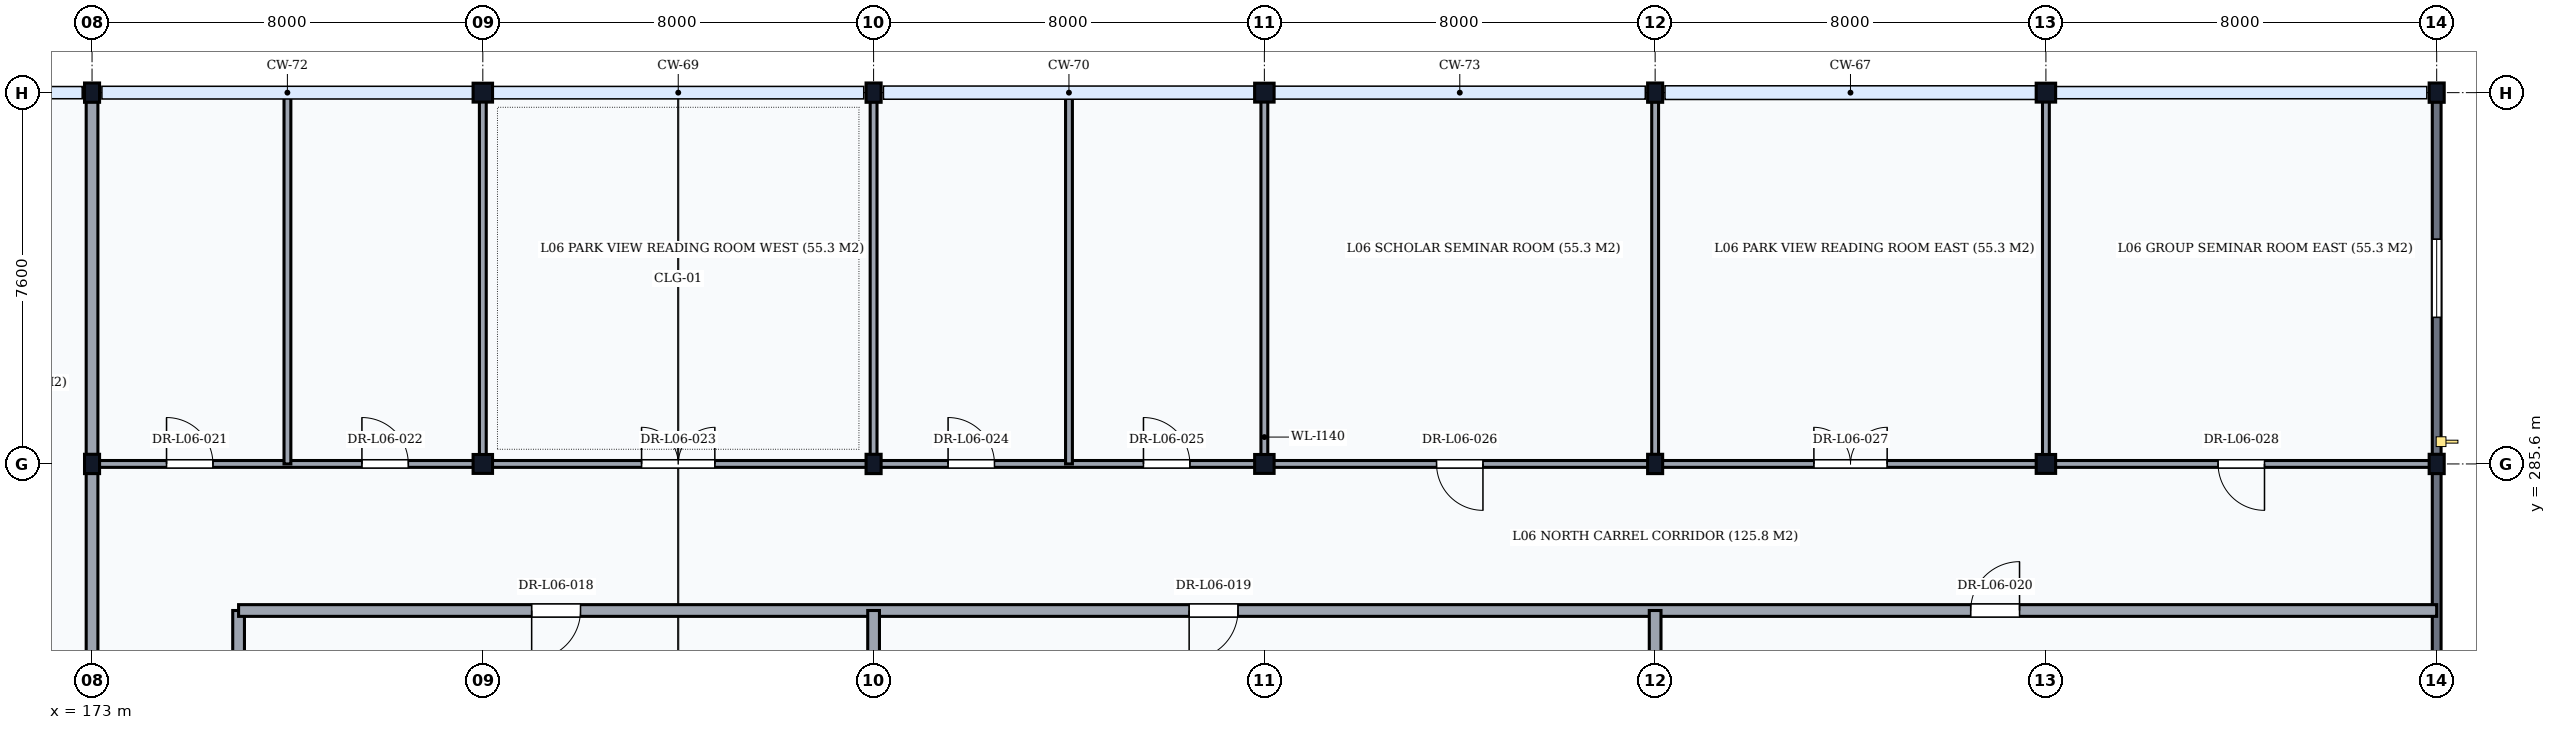
"""IFC4 building model, lengths in metres.
Left out: names, types, materials, properties, quantities, classifications, styles, units other than length and angle.
Written with IfcOpenShell. Run it as: python <this file> out.ifc"""

import sys

from ifc_helpers import new_model, si_unit, direction, frame, frame_2d, origin, origin_2d, place, context, subcontext, project, spatial, rectangle, i_section, extrude, element, fill, save


model = new_model("IFC4")
c1 = context("Model", 3, precision=1e-05, world=origin(), true_north=direction((0.0, 1.0)))
c2 = subcontext(c1, "Body", "Model", "MODEL_VIEW")
j1 = project(units=[si_unit("LENGTHUNIT", "METRE"), si_unit("PLANEANGLEUNIT", "RADIAN")], contexts=[c1])
p1 = place(None, origin())
s1 = spatial("IfcSite", under=j1, at=p1, CompositionType="ELEMENT")
p2 = place(p1, origin())
s2 = spatial("IfcBuilding", under=s1, at=p2, CompositionType="ELEMENT")
p3 = place(p2, frame((0.0, 0.0, 24.3)))
s3 = spatial("IfcBuildingStorey", under=s2, at=p3, CompositionType="ELEMENT", Elevation=24.3)
for number, where, z_axis, x_axis in (
    (1, (173.0, 285.6, 0.0), (0.0, 0.0, 1.0), (1.0, 0.0, 0.0)),
    (2, (173.0, 293.2, 0.0), (0.0, 0.0, 1.0), (1.0, 0.0, 0.0)),
):
    element("IfcColumn", number, at=place(p3, frame(where, z_axis=z_axis, x_axis=x_axis)), inside=s3, PredefinedType="COLUMN", context=c2, shape_type="SweptSolid", body=[
        extrude(i_section(OverallWidth=0.308, OverallDepth=0.395, WebThickness=0.021, FlangeThickness=0.04, FilletRadius=0.027, at=origin_2d()), origin(), (0.0, 0.0, 1.0), 3.9),
    ])
for number, where, z_axis, x_axis in (
    (3, (181.0, 285.6, 0.0), (0.0, 0.0, 1.0), (1.0, 0.0, 0.0)),
    (4, (181.0, 293.2, 0.0), (0.0, 0.0, 1.0), (1.0, 0.0, 0.0)),
):
    element("IfcColumn", number, at=place(p3, frame(where, z_axis=z_axis, x_axis=x_axis)), inside=s3, PredefinedType="COLUMN", context=c2, shape_type="SweptSolid", body=[
        extrude(i_section(OverallWidth=0.398, OverallDepth=0.387, WebThickness=0.021, FlangeThickness=0.033, FilletRadius=0.015, at=origin_2d()), origin(), (0.0, 0.0, 1.0), 3.9),
    ])
for number, where, z_axis, x_axis in (
    (5, (189.0, 285.6, 0.0), (0.0, 0.0, 1.0), (1.0, 0.0, 0.0)),
    (6, (189.0, 293.2, 0.0), (0.0, 0.0, 1.0), (1.0, 0.0, 0.0)),
):
    element("IfcColumn", number, at=place(p3, frame(where, z_axis=z_axis, x_axis=x_axis)), inside=s3, PredefinedType="COLUMN", context=c2, shape_type="SweptSolid", body=[
        extrude(i_section(OverallWidth=0.308, OverallDepth=0.395, WebThickness=0.021, FlangeThickness=0.04, FilletRadius=0.027, at=origin_2d()), origin(), (0.0, 0.0, 1.0), 3.9),
    ])
for number, where, z_axis, x_axis in (
    (7, (197.0, 285.6, 0.0), (0.0, 0.0, 1.0), (1.0, 0.0, 0.0)),
    (8, (197.0, 293.2, 0.0), (0.0, 0.0, 1.0), (1.0, 0.0, 0.0)),
):
    element("IfcColumn", number, at=place(p3, frame(where, z_axis=z_axis, x_axis=x_axis)), inside=s3, PredefinedType="COLUMN", context=c2, shape_type="SweptSolid", body=[
        extrude(i_section(OverallWidth=0.398, OverallDepth=0.387, WebThickness=0.021, FlangeThickness=0.033, FilletRadius=0.015, at=origin_2d()), origin(), (0.0, 0.0, 1.0), 3.9),
    ])
for number, where, z_axis, x_axis in (
    (9, (205.0, 285.6, 0.0), (0.0, 0.0, 1.0), (1.0, 0.0, 0.0)),
    (10, (205.0, 293.2, 0.0), (0.0, 0.0, 1.0), (1.0, 0.0, 0.0)),
):
    element("IfcColumn", number, at=place(p3, frame(where, z_axis=z_axis, x_axis=x_axis)), inside=s3, PredefinedType="COLUMN", context=c2, shape_type="SweptSolid", body=[
        extrude(i_section(OverallWidth=0.308, OverallDepth=0.395, WebThickness=0.021, FlangeThickness=0.04, FilletRadius=0.027, at=origin_2d()), origin(), (0.0, 0.0, 1.0), 3.9),
    ])
for number, where, z_axis, x_axis in (
    (11, (213.0, 285.6, 0.0), (0.0, 0.0, 1.0), (1.0, 0.0, 0.0)),
    (12, (213.0, 293.2, 0.0), (0.0, 0.0, 1.0), (1.0, 0.0, 0.0)),
):
    element("IfcColumn", number, at=place(p3, frame(where, z_axis=z_axis, x_axis=x_axis)), inside=s3, PredefinedType="COLUMN", context=c2, shape_type="SweptSolid", body=[
        extrude(i_section(OverallWidth=0.398, OverallDepth=0.387, WebThickness=0.021, FlangeThickness=0.033, FilletRadius=0.015, at=origin_2d()), origin(), (0.0, 0.0, 1.0), 3.9),
    ])
for number, where, z_axis, x_axis in (
    (13, (221.0, 285.6, 0.0), (0.0, 0.0, 1.0), (1.0, 0.0, 0.0)),
    (14, (221.0, 293.2, 0.0), (0.0, 0.0, 1.0), (1.0, 0.0, 0.0)),
):
    element("IfcColumn", number, at=place(p3, frame(where, z_axis=z_axis, x_axis=x_axis)), inside=s3, PredefinedType="COLUMN", context=c2, shape_type="SweptSolid", body=[
        extrude(i_section(OverallWidth=0.308, OverallDepth=0.395, WebThickness=0.021, FlangeThickness=0.04, FilletRadius=0.027, at=origin_2d()), origin(), (0.0, 0.0, 1.0), 3.9),
    ])
p4 = place(p3, frame((221.0, 278.006, 0.0), z_axis=(0.0, 0.0, 1.0), x_axis=(0.0, 1.0, 0.0)))
e15 = element("IfcWall", 15, at=p4, inside=s3, PredefinedType="SOLIDWALL", context=c2, shape_type="SweptSolid", body=[
    extrude(rectangle(XDim=7.588, YDim=0.18, at=frame_2d((3.794, 0.0))), origin(), (0.0, 0.0, 1.0), 3.388),
])
p5 = place(p4, frame((1.622, 0.0, 0.95)))
e16 = element("IfcOpeningElement", 16, at=p5, cuts=e15, PredefinedType="OPENING", context=c2, shape_type="SweptSolid", body=[
    extrude(rectangle(XDim=1.8, YDim=2.0, at=frame_2d((0.9, 1.0))), frame((0.0, 0.105, 0.0), z_axis=(0.0, -1.0, 0.0), x_axis=(1.0, 0.0, 0.0)), (0.0, 0.0, 1.0), 0.21),
])
p6 = place(p3, frame((221.0, 285.606, 0.0), z_axis=(0.0, 0.0, 1.0), x_axis=(0.0, 1.0, 0.0)))
e17 = element("IfcWall", 17, at=p6, inside=s3, PredefinedType="SOLIDWALL", context=c2, shape_type="SweptSolid", body=[
    extrude(rectangle(XDim=7.588, YDim=0.18, at=frame_2d((3.794, 0.0))), origin(), (0.0, 0.0, 1.0), 3.388),
])
p7 = place(p6, frame((2.994, 0.0, 0.95)))
e18 = element("IfcOpeningElement", 18, at=p7, cuts=e17, PredefinedType="OPENING", context=c2, shape_type="SweptSolid", body=[
    extrude(rectangle(XDim=1.6, YDim=2.0, at=frame_2d((0.8, 1.0))), frame((0.0, 0.105, 0.0), z_axis=(0.0, -1.0, 0.0), x_axis=(1.0, 0.0, 0.0)), (0.0, 0.0, 1.0), 0.21),
])
p8 = place(p3, frame((173.0, 258.2, 0.0), z_axis=(0.0, 0.0, 1.0), x_axis=(0.0, 1.0, 0.0)))
e19 = element("IfcWall", 19, at=p8, inside=s3, PredefinedType="PARTITIONING", context=c2, shape_type="SweptSolid", body=[
    extrude(rectangle(XDim=35.0, YDim=0.24, at=frame_2d((17.5, 0.0))), origin(), (0.0, 0.0, 1.0), 3.208),
])
p9 = place(p8, frame((21.5, 0.0, 0.0)))
e20 = element("IfcOpeningElement", 20, at=p9, cuts=e19, PredefinedType="OPENING", context=c2, shape_type="SweptSolid", body=[
    extrude(rectangle(XDim=1.0, YDim=2.1, at=frame_2d((0.5, 1.05))), frame((0.0, 0.135, 0.0), z_axis=(0.0, -1.0, 0.0), x_axis=(1.0, 0.0, 0.0)), (0.0, 0.0, 1.0), 0.27),
])
p10 = place(p3, frame((176.0, 258.2, 0.0), z_axis=(0.0, 0.0, 1.0), x_axis=(0.0, 1.0, 0.0)))
e21 = element("IfcWall", 21, at=p10, inside=s3, PredefinedType="PARTITIONING", context=c2, shape_type="SweptSolid", body=[
    extrude(rectangle(XDim=24.4, YDim=0.24, at=frame_2d((12.2, 0.0))), origin(), (0.0, 0.0, 1.0), 3.66),
])
p11 = place(p3, frame((176.0, 282.6, 0.0), z_axis=(0.0, 0.0, 1.0), x_axis=(1.0, 0.0, 0.0)))
e22 = element("IfcWall", 22, at=p11, inside=s3, PredefinedType="PARTITIONING", context=c2, shape_type="SweptSolid", body=[
    extrude(rectangle(XDim=45.0, YDim=0.24, at=frame_2d((22.5, 0.0))), origin(), (0.0, 0.0, 1.0), 3.66),
])
p12 = place(p11, frame((6.0, 0.0, 0.0)))
e23 = element("IfcOpeningElement", 23, at=p12, cuts=e22, PredefinedType="OPENING", context=c2, shape_type="SweptSolid", body=[
    extrude(rectangle(XDim=1.0, YDim=2.1, at=frame_2d((0.5, 1.05))), frame((0.0, 0.135, 0.0), z_axis=(0.0, -1.0, 0.0), x_axis=(1.0, 0.0, 0.0)), (0.0, 0.0, 1.0), 0.27),
])
p13 = place(p11, frame((19.46, 0.0, 0.0)))
e24 = element("IfcOpeningElement", 24, at=p13, cuts=e22, PredefinedType="OPENING", context=c2, shape_type="SweptSolid", body=[
    extrude(rectangle(XDim=1.0, YDim=2.1, at=frame_2d((0.5, 1.05))), frame((0.0, 0.135, 0.0), z_axis=(0.0, -1.0, 0.0), x_axis=(1.0, 0.0, 0.0)), (0.0, 0.0, 1.0), 0.27),
])
p14 = place(p11, frame((35.46, 0.0, 0.0)))
e25 = element("IfcOpeningElement", 25, at=p14, cuts=e22, PredefinedType="OPENING", context=c2, shape_type="SweptSolid", body=[
    extrude(rectangle(XDim=1.0, YDim=2.1, at=frame_2d((0.5, 1.05))), frame((0.0, 0.135, 0.0), z_axis=(0.0, -1.0, 0.0), x_axis=(1.0, 0.0, 0.0)), (0.0, 0.0, 1.0), 0.27),
])
for number, where, z_axis, x_axis in (
    (26, (189.0, 258.2, 0.0), (0.0, 0.0, 1.0), (0.0, 1.0, 0.0)),
    (27, (205.0, 258.2, 0.0), (0.0, 0.0, 1.0), (0.0, 1.0, 0.0)),
):
    element("IfcWall", number, at=place(p3, frame(where, z_axis=z_axis, x_axis=x_axis)), inside=s3, PredefinedType="PARTITIONING", context=c2, shape_type="SweptSolid", body=[
        extrude(rectangle(XDim=24.4, YDim=0.24, at=frame_2d((12.2, 0.0))), origin(), (0.0, 0.0, 1.0), 3.208),
    ])
p15 = place(p3, frame((173.0, 285.6, 0.0), z_axis=(0.0, 0.0, 1.0), x_axis=(1.0, 0.0, 0.0)))
e28 = element("IfcWall", 28, at=p15, inside=s3, PredefinedType="PARTITIONING", context=c2, shape_type="SweptSolid", body=[
    extrude(rectangle(XDim=48.0, YDim=0.14, at=frame_2d((24.0, 0.0))), origin(), (0.0, 0.0, 1.0), 3.058),
])
p16 = place(p15, frame((1.525, 0.0, 0.0)))
e29 = element("IfcOpeningElement", 29, at=p16, cuts=e28, PredefinedType="OPENING", context=c2, shape_type="SweptSolid", body=[
    extrude(rectangle(XDim=0.95, YDim=2.1, at=frame_2d((0.475, 1.05))), frame((0.0, 0.085, 0.0), z_axis=(0.0, -1.0, 0.0), x_axis=(1.0, 0.0, 0.0)), (0.0, 0.0, 1.0), 0.17),
])
p17 = place(p15, frame((5.525, 0.0, 0.0)))
e30 = element("IfcOpeningElement", 30, at=p17, cuts=e28, PredefinedType="OPENING", context=c2, shape_type="SweptSolid", body=[
    extrude(rectangle(XDim=0.95, YDim=2.1, at=frame_2d((0.475, 1.05))), frame((0.0, 0.085, 0.0), z_axis=(0.0, -1.0, 0.0), x_axis=(1.0, 0.0, 0.0)), (0.0, 0.0, 1.0), 0.17),
])
p18 = place(p15, frame((11.25, 0.0, 0.0)))
e31 = element("IfcOpeningElement", 31, at=p18, cuts=e28, PredefinedType="OPENING", context=c2, shape_type="SweptSolid", body=[
    extrude(rectangle(XDim=1.5, YDim=2.25, at=frame_2d((0.75, 1.125))), frame((0.0, 0.085, 0.0), z_axis=(0.0, -1.0, 0.0), x_axis=(1.0, 0.0, 0.0)), (0.0, 0.0, 1.0), 0.17),
])
p19 = place(p15, frame((17.525, 0.0, 0.0)))
e32 = element("IfcOpeningElement", 32, at=p19, cuts=e28, PredefinedType="OPENING", context=c2, shape_type="SweptSolid", body=[
    extrude(rectangle(XDim=0.95, YDim=2.1, at=frame_2d((0.475, 1.05))), frame((0.0, 0.085, 0.0), z_axis=(0.0, -1.0, 0.0), x_axis=(1.0, 0.0, 0.0)), (0.0, 0.0, 1.0), 0.17),
])
p20 = place(p15, frame((21.525, 0.0, 0.0)))
e33 = element("IfcOpeningElement", 33, at=p20, cuts=e28, PredefinedType="OPENING", context=c2, shape_type="SweptSolid", body=[
    extrude(rectangle(XDim=0.95, YDim=2.1, at=frame_2d((0.475, 1.05))), frame((0.0, 0.085, 0.0), z_axis=(0.0, -1.0, 0.0), x_axis=(1.0, 0.0, 0.0)), (0.0, 0.0, 1.0), 0.17),
])
p21 = place(p15, frame((27.525, 0.0, 0.0)))
e34 = element("IfcOpeningElement", 34, at=p21, cuts=e28, PredefinedType="OPENING", context=c2, shape_type="SweptSolid", body=[
    extrude(rectangle(XDim=0.95, YDim=2.1, at=frame_2d((0.475, 1.05))), frame((0.0, 0.085, 0.0), z_axis=(0.0, -1.0, 0.0), x_axis=(1.0, 0.0, 0.0)), (0.0, 0.0, 1.0), 0.17),
])
p22 = place(p15, frame((35.25, 0.0, 0.0)))
e35 = element("IfcOpeningElement", 35, at=p22, cuts=e28, PredefinedType="OPENING", context=c2, shape_type="SweptSolid", body=[
    extrude(rectangle(XDim=1.5, YDim=2.25, at=frame_2d((0.75, 1.125))), frame((0.0, 0.085, 0.0), z_axis=(0.0, -1.0, 0.0), x_axis=(1.0, 0.0, 0.0)), (0.0, 0.0, 1.0), 0.17),
])
p23 = place(p15, frame((43.525, 0.0, 0.0)))
e36 = element("IfcOpeningElement", 36, at=p23, cuts=e28, PredefinedType="OPENING", context=c2, shape_type="SweptSolid", body=[
    extrude(rectangle(XDim=0.95, YDim=2.1, at=frame_2d((0.475, 1.05))), frame((0.0, 0.085, 0.0), z_axis=(0.0, -1.0, 0.0), x_axis=(1.0, 0.0, 0.0)), (0.0, 0.0, 1.0), 0.17),
])
p24 = place(p3, frame((177.0, 285.6, 0.0), z_axis=(0.0, 0.0, 1.0), x_axis=(0.0, 1.0, 0.0)))
e37 = element("IfcWall", 37, at=p24, inside=s3, PredefinedType="PARTITIONING", context=c2, shape_type="SweptSolid", body=[
    extrude(rectangle(XDim=7.6, YDim=0.14, at=frame_2d((3.8, 0.0))), origin(), (0.0, 0.0, 1.0), 3.388),
])
for number, where, z_axis, x_axis in (
    (38, (181.0, 285.6, 0.0), (0.0, 0.0, 1.0), (0.0, 1.0, 0.0)),
    (39, (189.0, 285.6, 0.0), (0.0, 0.0, 1.0), (0.0, 1.0, 0.0)),
):
    element("IfcWall", number, at=place(p3, frame(where, z_axis=z_axis, x_axis=x_axis)), inside=s3, PredefinedType="PARTITIONING", context=c2, shape_type="SweptSolid", body=[
        extrude(rectangle(XDim=7.6, YDim=0.14, at=frame_2d((3.8, 0.0))), origin(), (0.0, 0.0, 1.0), 3.208),
    ])
p25 = place(p3, frame((193.0, 285.6, 0.0), z_axis=(0.0, 0.0, 1.0), x_axis=(0.0, 1.0, 0.0)))
e40 = element("IfcWall", 40, at=p25, inside=s3, PredefinedType="PARTITIONING", context=c2, shape_type="SweptSolid", body=[
    extrude(rectangle(XDim=7.6, YDim=0.14, at=frame_2d((3.8, 0.0))), origin(), (0.0, 0.0, 1.0), 3.388),
])
for number, where, z_axis, x_axis in (
    (41, (197.0, 285.6, 0.0), (0.0, 0.0, 1.0), (0.0, 1.0, 0.0)),
    (42, (205.0, 285.6, 0.0), (0.0, 0.0, 1.0), (0.0, 1.0, 0.0)),
    (43, (213.0, 285.6, 0.0), (0.0, 0.0, 1.0), (0.0, 1.0, 0.0)),
):
    element("IfcWall", number, at=place(p3, frame(where, z_axis=z_axis, x_axis=x_axis)), inside=s3, PredefinedType="PARTITIONING", context=c2, shape_type="SweptSolid", body=[
        extrude(rectangle(XDim=7.6, YDim=0.14, at=frame_2d((3.8, 0.0))), origin(), (0.0, 0.0, 1.0), 3.208),
    ])
p26 = place(p7, origin())
e44 = element("IfcWindow", 44, at=p26, inside=s3, PartitioningType="SINGLE_PANEL", PredefinedType="WINDOW", context=c2, shape_type="SweptSolid", body=[
    extrude(rectangle(XDim=1.6, YDim=2.0, at=frame_2d((0.8, 1.0))), frame((0.0, 0.03, 0.0), z_axis=(0.0, -1.0, 0.0), x_axis=(1.0, 0.0, 0.0)), (0.0, 0.0, 1.0), 0.06),
])
fill(e18, e44)
p27 = place(p12, frame((1.0, 0.0, 0.0), z_axis=(0.0, 0.0, 1.0), x_axis=(-1.0, 0.0, 0.0)))
e45 = element("IfcDoor", 45, at=p27, inside=s3, OperationType="SINGLE_SWING_RIGHT", PredefinedType="DOOR", context=c2, shape_type="SweptSolid", body=[
    extrude(rectangle(XDim=1.0, YDim=2.1, at=frame_2d((0.5, 1.05))), frame((0.0, 0.025, 0.0), z_axis=(0.0, -1.0, 0.0), x_axis=(1.0, 0.0, 0.0)), (0.0, 0.0, 1.0), 0.05),
])
fill(e23, e45)
p28 = place(p13, frame((1.0, 0.0, 0.0), z_axis=(0.0, 0.0, 1.0), x_axis=(-1.0, 0.0, 0.0)))
e46 = element("IfcDoor", 46, at=p28, inside=s3, OperationType="SINGLE_SWING_RIGHT", PredefinedType="DOOR", context=c2, shape_type="SweptSolid", body=[
    extrude(rectangle(XDim=1.0, YDim=2.1, at=frame_2d((0.5, 1.05))), frame((0.0, 0.025, 0.0), z_axis=(0.0, -1.0, 0.0), x_axis=(1.0, 0.0, 0.0)), (0.0, 0.0, 1.0), 0.05),
])
fill(e24, e46)
p29 = place(p14, frame((1.0, 0.0, 0.0), z_axis=(0.0, 0.0, 1.0), x_axis=(-1.0, 0.0, 0.0)))
e47 = element("IfcDoor", 47, at=p29, inside=s3, OperationType="SINGLE_SWING_LEFT", PredefinedType="DOOR", context=c2, shape_type="SweptSolid", body=[
    extrude(rectangle(XDim=1.0, YDim=2.1, at=frame_2d((0.5, 1.05))), frame((0.0, 0.025, 0.0), z_axis=(0.0, -1.0, 0.0), x_axis=(1.0, 0.0, 0.0)), (0.0, 0.0, 1.0), 0.05),
])
fill(e25, e47)
p30 = place(p16, origin())
e48 = element("IfcDoor", 48, at=p30, inside=s3, OperationType="SINGLE_SWING_LEFT", PredefinedType="DOOR", context=c2, shape_type="SweptSolid", body=[
    extrude(rectangle(XDim=0.95, YDim=2.1, at=frame_2d((0.475, 1.05))), frame((0.0, 0.025, 0.0), z_axis=(0.0, -1.0, 0.0), x_axis=(1.0, 0.0, 0.0)), (0.0, 0.0, 1.0), 0.05),
])
fill(e29, e48)
p31 = place(p17, origin())
e49 = element("IfcDoor", 49, at=p31, inside=s3, OperationType="SINGLE_SWING_LEFT", PredefinedType="DOOR", context=c2, shape_type="SweptSolid", body=[
    extrude(rectangle(XDim=0.95, YDim=2.1, at=frame_2d((0.475, 1.05))), frame((0.0, 0.025, 0.0), z_axis=(0.0, -1.0, 0.0), x_axis=(1.0, 0.0, 0.0)), (0.0, 0.0, 1.0), 0.05),
])
fill(e30, e49)
p32 = place(p18, origin())
e50 = element("IfcDoor", 50, at=p32, inside=s3, OperationType="DOUBLE_DOOR_SINGLE_SWING", PredefinedType="DOOR", context=c2, shape_type="SweptSolid", body=[
    extrude(rectangle(XDim=1.5, YDim=2.25, at=frame_2d((0.75, 1.125))), frame((0.0, 0.025, 0.0), z_axis=(0.0, -1.0, 0.0), x_axis=(1.0, 0.0, 0.0)), (0.0, 0.0, 1.0), 0.05),
])
fill(e31, e50)
p33 = place(p19, origin())
e51 = element("IfcDoor", 51, at=p33, inside=s3, OperationType="SINGLE_SWING_LEFT", PredefinedType="DOOR", context=c2, shape_type="SweptSolid", body=[
    extrude(rectangle(XDim=0.95, YDim=2.1, at=frame_2d((0.475, 1.05))), frame((0.0, 0.025, 0.0), z_axis=(0.0, -1.0, 0.0), x_axis=(1.0, 0.0, 0.0)), (0.0, 0.0, 1.0), 0.05),
])
fill(e32, e51)
p34 = place(p20, origin())
e52 = element("IfcDoor", 52, at=p34, inside=s3, OperationType="SINGLE_SWING_LEFT", PredefinedType="DOOR", context=c2, shape_type="SweptSolid", body=[
    extrude(rectangle(XDim=0.95, YDim=2.1, at=frame_2d((0.475, 1.05))), frame((0.0, 0.025, 0.0), z_axis=(0.0, -1.0, 0.0), x_axis=(1.0, 0.0, 0.0)), (0.0, 0.0, 1.0), 0.05),
])
fill(e33, e52)
p35 = place(p21, origin())
e53 = element("IfcDoor", 53, at=p35, inside=s3, OperationType="SINGLE_SWING_RIGHT", PredefinedType="DOOR", context=c2, shape_type="SweptSolid", body=[
    extrude(rectangle(XDim=0.95, YDim=2.1, at=frame_2d((0.475, 1.05))), frame((0.0, 0.025, 0.0), z_axis=(0.0, -1.0, 0.0), x_axis=(1.0, 0.0, 0.0)), (0.0, 0.0, 1.0), 0.05),
])
fill(e34, e53)
p36 = place(p22, origin())
e54 = element("IfcDoor", 54, at=p36, inside=s3, OperationType="DOUBLE_DOOR_SINGLE_SWING", PredefinedType="DOOR", context=c2, shape_type="SweptSolid", body=[
    extrude(rectangle(XDim=1.5, YDim=2.25, at=frame_2d((0.75, 1.125))), frame((0.0, 0.025, 0.0), z_axis=(0.0, -1.0, 0.0), x_axis=(1.0, 0.0, 0.0)), (0.0, 0.0, 1.0), 0.05),
])
fill(e35, e54)
p37 = place(p23, origin())
e55 = element("IfcDoor", 55, at=p37, inside=s3, OperationType="SINGLE_SWING_RIGHT", PredefinedType="DOOR", context=c2, shape_type="SweptSolid", body=[
    extrude(rectangle(XDim=0.95, YDim=2.1, at=frame_2d((0.475, 1.05))), frame((0.0, 0.025, 0.0), z_axis=(0.0, -1.0, 0.0), x_axis=(1.0, 0.0, 0.0)), (0.0, 0.0, 1.0), 0.05),
])
fill(e36, e55)
save(model, sys.argv[1])
